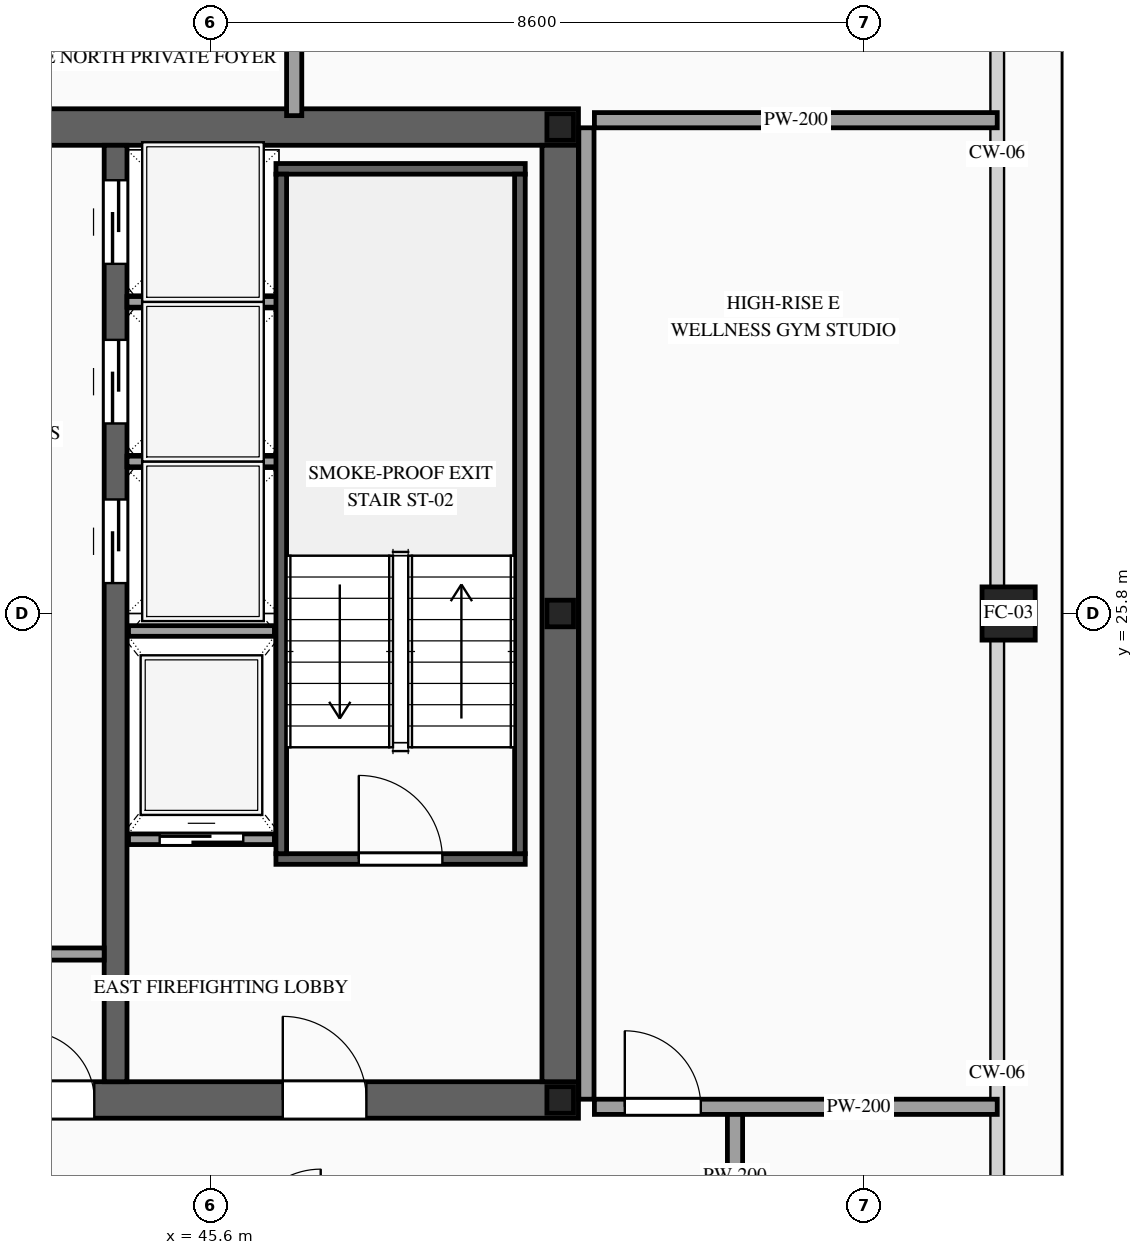
"""IFC4 building model, lengths in metres.
Left out: names, types, materials, properties, quantities, classifications, styles, units other than length and angle.
Written with IfcOpenShell. Run it as: python <this file> out.ifc"""

import sys

from ifc_helpers import new_model, si_unit, direction, frame, frame_2d, origin, origin_2d, place, context, subcontext, project, spatial, rectangle, hollow_rectangle, i_section, extrude, source, transform, mapped, element, fill, save


model = new_model("IFC4")
c1 = context("Model", 3, precision=1e-05, world=origin(), true_north=direction((0.0, 1.0)))
c2 = subcontext(c1, "Body", "Model", "MODEL_VIEW")
j1 = project(units=[si_unit("LENGTHUNIT", "METRE"), si_unit("PLANEANGLEUNIT", "RADIAN")], contexts=[c1])
p1 = place(None, origin())
s1 = spatial("IfcSite", under=j1, at=p1, CompositionType="ELEMENT")
p2 = place(p1, origin())
s2 = spatial("IfcBuilding", under=s1, at=p2, CompositionType="ELEMENT")
p3 = place(p2, frame((0.0, 0.0, 303.1)))
s3 = spatial("IfcBuildingStorey", under=s2, at=p3, CompositionType="ELEMENT", Elevation=303.1)
p4 = place(p3, frame((23.56, 19.4, 0.0), z_axis=(0.0, 0.0, 1.0), x_axis=(1.0, 0.0, 0.0)))
e1 = element("IfcWall", 1, at=p4, inside=s3, PredefinedType="SHEAR", context=c2, shape_type="SweptSolid", body=[
    extrude(rectangle(XDim=26.88, YDim=0.48, at=frame_2d((13.44, 0.0))), origin(), (0.0, 0.0, 1.0), 3.5),
])
p5 = place(p4, frame((1.89, 0.0, 0.0)))
e2 = element("IfcOpeningElement", 2, at=p5, cuts=e1, PredefinedType="OPENING", context=c2, shape_type="SweptSolid", body=[
    extrude(rectangle(XDim=1.1, YDim=2.2, at=frame_2d((0.55, 1.1))), frame((0.0, 0.255, 0.0), z_axis=(0.0, -1.0, 0.0), x_axis=(1.0, 0.0, 0.0)), (0.0, 0.0, 1.0), 0.51),
])
p6 = place(p4, frame((9.79, 0.0, 0.0)))
e3 = element("IfcOpeningElement", 3, at=p6, cuts=e1, PredefinedType="OPENING", context=c2, shape_type="SweptSolid", body=[
    extrude(rectangle(XDim=1.1, YDim=2.2, at=frame_2d((0.55, 1.1))), frame((0.0, 0.255, 0.0), z_axis=(0.0, -1.0, 0.0), x_axis=(1.0, 0.0, 0.0)), (0.0, 0.0, 1.0), 0.51),
])
p7 = place(p4, frame((22.99, 0.0, 0.0)))
e4 = element("IfcOpeningElement", 4, at=p7, cuts=e1, PredefinedType="OPENING", context=c2, shape_type="SweptSolid", body=[
    extrude(rectangle(XDim=1.1, YDim=2.2, at=frame_2d((0.55, 1.1))), frame((0.0, 0.255, 0.0), z_axis=(0.0, -1.0, 0.0), x_axis=(1.0, 0.0, 0.0)), (0.0, 0.0, 1.0), 0.51),
])
p8 = place(p4, frame((19.61, 0.0, 0.0)))
e5 = element("IfcOpeningElement", 5, at=p8, cuts=e1, PredefinedType="OPENING", context=c2, shape_type="SweptSolid", body=[
    extrude(rectangle(XDim=0.9, YDim=2.15, at=frame_2d((0.45, 1.075))), frame((0.0, 0.255, 0.0), z_axis=(0.0, -1.0, 0.0), x_axis=(1.0, 0.0, 0.0)), (0.0, 0.0, 1.0), 0.51),
])
p9 = place(p4, frame((18.17, 0.0, 0.0)))
e6 = element("IfcOpeningElement", 6, at=p9, cuts=e1, PredefinedType="OPENING", context=c2, shape_type="SweptSolid", body=[
    extrude(rectangle(XDim=0.9, YDim=2.15, at=frame_2d((0.45, 1.075))), frame((0.0, 0.255, 0.0), z_axis=(0.0, -1.0, 0.0), x_axis=(1.0, 0.0, 0.0)), (0.0, 0.0, 1.0), 0.51),
])
p10 = place(p3, frame((23.56, 32.2, 0.0), z_axis=(0.0, 0.0, 1.0), x_axis=(1.0, 0.0, 0.0)))
e7 = element("IfcWall", 7, at=p10, inside=s3, PredefinedType="SHEAR", context=c2, shape_type="SweptSolid", body=[
    extrude(rectangle(XDim=26.88, YDim=0.48, at=frame_2d((13.44, 0.0))), origin(), (0.0, 0.0, 1.0), 3.5),
])
p11 = place(p10, frame((4.51, 0.0, 0.0)))
e8 = element("IfcOpeningElement", 8, at=p11, cuts=e7, PredefinedType="OPENING", context=c2, shape_type="SweptSolid", body=[
    extrude(rectangle(XDim=0.9, YDim=2.15, at=frame_2d((0.45, 1.075))), frame((0.0, 0.255, 0.0), z_axis=(0.0, -1.0, 0.0), x_axis=(1.0, 0.0, 0.0)), (0.0, 0.0, 1.0), 0.51),
])
p12 = place(p10, frame((9.79, 0.0, 0.0)))
e9 = element("IfcOpeningElement", 9, at=p12, cuts=e7, PredefinedType="OPENING", context=c2, shape_type="SweptSolid", body=[
    extrude(rectangle(XDim=1.1, YDim=2.2, at=frame_2d((0.55, 1.1))), frame((0.0, 0.255, 0.0), z_axis=(0.0, -1.0, 0.0), x_axis=(1.0, 0.0, 0.0)), (0.0, 0.0, 1.0), 0.51),
])
p13 = place(p10, frame((15.64, 0.0, 0.0)))
e10 = element("IfcOpeningElement", 10, at=p13, cuts=e7, PredefinedType="OPENING", context=c2, shape_type="SweptSolid", body=[
    extrude(rectangle(XDim=1.1, YDim=2.2, at=frame_2d((0.55, 1.1))), frame((0.0, 0.255, 0.0), z_axis=(0.0, -1.0, 0.0), x_axis=(1.0, 0.0, 0.0)), (0.0, 0.0, 1.0), 0.51),
])
p14 = place(p10, frame((18.74, 0.0, 0.0)))
e11 = element("IfcOpeningElement", 11, at=p14, cuts=e7, PredefinedType="OPENING", context=c2, shape_type="SweptSolid", body=[
    extrude(rectangle(XDim=1.1, YDim=2.2, at=frame_2d((0.55, 1.1))), frame((0.0, 0.255, 0.0), z_axis=(0.0, -1.0, 0.0), x_axis=(1.0, 0.0, 0.0)), (0.0, 0.0, 1.0), 0.51),
])
m1 = source(origin(), c2, "Body", "SweptSolid", [
    extrude(rectangle(XDim=12.32, YDim=0.48, at=frame_2d((6.16, 0.0))), origin(), (0.0, 0.0, 1.0), 3.5),
])
p15 = place(p3, frame((50.2, 19.64, 0.0), z_axis=(0.0, 0.0, 1.0), x_axis=(0.0, 1.0, 0.0)))
e12 = element("IfcWall", 12, at=p15, inside=s3, PredefinedType="SHEAR", context=c2, shape_type="MappedRepresentation", body=[
    mapped(m1, transform((0.0, 0.0, 0.0), scale=1.0)),
])
p16 = place(p3, frame((44.35, 19.64, 0.0), z_axis=(0.0, 0.0, 1.0), x_axis=(0.0, 1.0, 0.0)))
e13 = element("IfcWall", 13, at=p16, inside=s3, PredefinedType="SOLIDWALL", context=c2, shape_type="SweptSolid", body=[
    extrude(rectangle(XDim=12.32, YDim=0.3, at=frame_2d((6.16, 0.0))), origin(), (0.0, 0.0, 1.0), 3.5),
])
p17 = place(p16, frame((6.56, 0.0, 0.0)))
e14 = element("IfcOpeningElement", 14, at=p17, cuts=e13, PredefinedType="OPENING", context=c2, shape_type="SweptSolid", body=[
    extrude(rectangle(XDim=1.1, YDim=2.2, at=frame_2d((0.55, 1.1))), frame((0.0, 0.165, 0.0), z_axis=(0.0, -1.0, 0.0), x_axis=(1.0, 0.0, 0.0)), (0.0, 0.0, 1.0), 0.33),
])
p18 = place(p16, frame((8.66, 0.0, 0.0)))
e15 = element("IfcOpeningElement", 15, at=p18, cuts=e13, PredefinedType="OPENING", context=c2, shape_type="SweptSolid", body=[
    extrude(rectangle(XDim=1.1, YDim=2.2, at=frame_2d((0.55, 1.1))), frame((0.0, 0.165, 0.0), z_axis=(0.0, -1.0, 0.0), x_axis=(1.0, 0.0, 0.0)), (0.0, 0.0, 1.0), 0.33),
])
p19 = place(p16, frame((10.76, 0.0, 0.0)))
e16 = element("IfcOpeningElement", 16, at=p19, cuts=e13, PredefinedType="OPENING", context=c2, shape_type="SweptSolid", body=[
    extrude(rectangle(XDim=1.1, YDim=2.2, at=frame_2d((0.55, 1.1))), frame((0.0, 0.165, 0.0), z_axis=(0.0, -1.0, 0.0), x_axis=(1.0, 0.0, 0.0)), (0.0, 0.0, 1.0), 0.33),
])
m2 = source(origin(), c2, "Body", "SweptSolid", [
    extrude(i_section(OverallWidth=0.35, OverallDepth=0.35, WebThickness=0.012, FlangeThickness=0.019, at=origin_2d()), origin(), (0.0, 0.0, 1.0), 3.5),
])
for number, where, z_axis, x_axis in (
    (17, (50.2, 19.4, 0.0), (0.0, 0.0, 1.0), (1.0, 0.0, 0.0)),
    (18, (50.2, 25.8, 0.0), (0.0, 0.0, 1.0), (1.0, 0.0, 0.0)),
    (19, (50.2, 32.2, 0.0), (0.0, 0.0, 1.0), (1.0, 0.0, 0.0)),
):
    element("IfcColumn", number, at=place(p3, frame(where, z_axis=z_axis, x_axis=x_axis)), inside=s3, PredefinedType="COLUMN", context=c2, shape_type="MappedRepresentation", body=[
        mapped(m2, transform((0.0, 0.0, 0.0), scale=1.0)),
    ])
m3 = source(origin(), c2, "Body", "SweptSolid", [
    extrude(hollow_rectangle(XDim=0.7, YDim=0.7, WallThickness=0.032, at=origin_2d()), origin(), (0.0, 0.0, 1.0), 3.5),
])
p20 = place(p3, frame((56.1, 25.8, 0.0), z_axis=(0.0, 0.0, 1.0), x_axis=(1.0, 0.0, 0.0)))
e20 = element("IfcColumn", 20, at=p20, inside=s3, PredefinedType="COLUMN", context=c2, shape_type="MappedRepresentation", body=[
    mapped(m3, transform((0.0, 0.0, 0.0), scale=1.0)),
])
p21 = place(p3, frame((44.52, 22.83, 0.0), z_axis=(0.0, 0.0, 1.0), x_axis=(1.0, 0.0, 0.0)))
e21 = element("IfcWall", 21, at=p21, inside=s3, PredefinedType="SOLIDWALL", context=c2, shape_type="SweptSolid", body=[
    extrude(rectangle(XDim=1.92, YDim=0.14, at=frame_2d((0.96, 0.0))), origin(), (0.0, 0.0, 1.0), 3.22),
])
p22 = place(p21, frame((0.41, 0.0, 0.0)))
e22 = element("IfcOpeningElement", 22, at=p22, cuts=e21, PredefinedType="OPENING", context=c2, shape_type="SweptSolid", body=[
    extrude(rectangle(XDim=1.1, YDim=2.2, at=frame_2d((0.55, 1.1))), frame((0.0, 0.085, 0.0), z_axis=(0.0, -1.0, 0.0), x_axis=(1.0, 0.0, 0.0)), (0.0, 0.0, 1.0), 0.17),
])
m4 = source(origin(), c2, "Body", "SweptSolid", [
    extrude(rectangle(XDim=1.92, YDim=0.14, at=frame_2d((0.96, 0.0))), origin(), (0.0, 0.0, 1.0), 3.22),
])
p23 = place(p3, frame((44.52, 25.57, 0.0), z_axis=(0.0, 0.0, 1.0), x_axis=(1.0, 0.0, 0.0)))
e23 = element("IfcWall", 23, at=p23, inside=s3, PredefinedType="SOLIDWALL", context=c2, shape_type="MappedRepresentation", body=[
    mapped(m4, transform((0.0, 0.0, 0.0), scale=1.0)),
])
m5 = source(origin(), c2, "Body", "SweptSolid", [
    extrude(rectangle(XDim=2.0, YDim=0.14, at=frame_2d((1.0, 0.0))), origin(), (0.0, 0.0, 1.0), 3.22),
])
for number, where, z_axis, x_axis in (
    (24, (44.5, 27.8, 0.0), (0.0, 0.0, 1.0), (1.0, 0.0, 0.0)),
    (25, (44.5, 29.9, 0.0), (0.0, 0.0, 1.0), (1.0, 0.0, 0.0)),
):
    element("IfcWall", number, at=place(p3, frame(where, z_axis=z_axis, x_axis=x_axis)), inside=s3, PredefinedType="SOLIDWALL", context=c2, shape_type="MappedRepresentation", body=[
        mapped(m5, transform((0.0, 0.0, 0.0), scale=1.0)),
    ])
p24 = place(p3, frame((46.46, 22.57, 0.0), z_axis=(0.0, 0.0, 1.0), x_axis=(1.0, 0.0, 0.0)))
e26 = element("IfcWall", 26, at=p24, inside=s3, PredefinedType="SOLIDWALL", context=c2, shape_type="SweptSolid", body=[
    extrude(rectangle(XDim=3.28, YDim=0.14, at=frame_2d((1.64, 0.0))), origin(), (0.0, 0.0, 1.0), 3.22),
])
p25 = place(p24, frame((1.09, 0.0, 0.0)))
e27 = element("IfcOpeningElement", 27, at=p25, cuts=e26, PredefinedType="OPENING", context=c2, shape_type="SweptSolid", body=[
    extrude(rectangle(XDim=1.1, YDim=2.2, at=frame_2d((0.55, 1.1))), frame((0.0, 0.085, 0.0), z_axis=(0.0, -1.0, 0.0), x_axis=(1.0, 0.0, 0.0)), (0.0, 0.0, 1.0), 0.17),
])
m6 = source(origin(), c2, "Body", "SweptSolid", [
    extrude(rectangle(XDim=3.28, YDim=0.14, at=frame_2d((1.64, 0.0))), origin(), (0.0, 0.0, 1.0), 3.22),
])
p26 = place(p3, frame((46.46, 31.65, 0.0), z_axis=(0.0, 0.0, 1.0), x_axis=(1.0, 0.0, 0.0)))
e28 = element("IfcWall", 28, at=p26, inside=s3, PredefinedType="SOLIDWALL", context=c2, shape_type="MappedRepresentation", body=[
    mapped(m6, transform((0.0, 0.0, 0.0), scale=1.0)),
])
m7 = source(origin(), c2, "Body", "SweptSolid", [
    extrude(rectangle(XDim=8.94, YDim=0.14, at=frame_2d((4.47, 0.0))), origin(), (0.0, 0.0, 1.0), 3.22),
])
for number, where, z_axis, x_axis in (
    (29, (46.53, 22.64, 0.0), (0.0, 0.0, 1.0), (0.0, 1.0, 0.0)),
    (30, (49.67, 22.64, 0.0), (0.0, 0.0, 1.0), (0.0, 1.0, 0.0)),
):
    element("IfcWall", number, at=place(p3, frame(where, z_axis=z_axis, x_axis=x_axis)), inside=s3, PredefinedType="SOLIDWALL", context=c2, shape_type="MappedRepresentation", body=[
        mapped(m7, transform((0.0, 0.0, 0.0), scale=1.0)),
    ])
m8 = source(origin(), c2, "Body", "SweptSolid", [
    extrude(rectangle(XDim=1.17, YDim=0.16, at=frame_2d((0.585, 0.0))), origin(), (0.0, 0.0, 1.0), 3.22),
])
p27 = place(p3, frame((43.03, 21.32, 0.0), z_axis=(0.0, 0.0, 1.0), x_axis=(1.0, 0.0, 0.0)))
e31 = element("IfcWall", 31, at=p27, inside=s3, PredefinedType="PARTITIONING", context=c2, shape_type="MappedRepresentation", body=[
    mapped(m8, transform((0.0, 0.0, 0.0), scale=1.0)),
])
m9 = source(origin(), c2, "Body", "SweptSolid", [
    extrude(rectangle(XDim=1.7, YDim=0.2, at=frame_2d((0.85, 0.0))), origin(), (0.0, 0.0, 1.0), 3.22),
])
for number, where, z_axis, x_axis in (
    (32, (46.7, 32.35, 0.0), (0.0, 0.0, 1.0), (0.0, 1.0, 0.0)),
    (33, (52.5, 17.55, 0.0), (0.0, 0.0, 1.0), (0.0, 1.0, 0.0)),
):
    element("IfcWall", number, at=place(p3, frame(where, z_axis=z_axis, x_axis=x_axis)), inside=s3, PredefinedType="PARTITIONING", context=c2, shape_type="MappedRepresentation", body=[
        mapped(m9, transform((0.0, 0.0, 0.0), scale=1.0)),
    ])
p28 = place(p3, frame((50.65, 19.31, 0.0), z_axis=(0.0, 0.0, 1.0), x_axis=(1.0, 0.0, 0.0)))
e34 = element("IfcWall", 34, at=p28, inside=s3, PredefinedType="PARTITIONING", context=c2, shape_type="SweptSolid", body=[
    extrude(rectangle(XDim=5.3, YDim=0.2, at=frame_2d((2.65, 0.0))), origin(), (0.0, 0.0, 1.0), 2.765),
])
p29 = place(p28, frame((0.4, 0.0, 0.0)))
e35 = element("IfcOpeningElement", 35, at=p29, cuts=e34, PredefinedType="OPENING", context=c2, shape_type="SweptSolid", body=[
    extrude(rectangle(XDim=1.0, YDim=2.2, at=frame_2d((0.5, 1.1))), frame((0.0, 0.115, 0.0), z_axis=(0.0, -1.0, 0.0), x_axis=(1.0, 0.0, 0.0)), (0.0, 0.0, 1.0), 0.23),
])
m10 = source(origin(), c2, "Body", "SweptSolid", [
    extrude(rectangle(XDim=5.3, YDim=0.2, at=frame_2d((2.65, 0.0))), origin(), (0.0, 0.0, 1.0), 2.765),
])
p30 = place(p3, frame((50.65, 32.29, 0.0), z_axis=(0.0, 0.0, 1.0), x_axis=(1.0, 0.0, 0.0)))
e36 = element("IfcWall", 36, at=p30, inside=s3, PredefinedType="PARTITIONING", context=c2, shape_type="MappedRepresentation", body=[
    mapped(m10, transform((0.0, 0.0, 0.0), scale=1.0)),
])
m11 = source(origin(), c2, "Body", "SweptSolid", [
    extrude(rectangle(XDim=12.78, YDim=0.2, at=frame_2d((6.39, 0.0))), origin(), (0.0, 0.0, 1.0), 3.22),
])
p31 = place(p3, frame((50.545, 19.41, 0.0), z_axis=(0.0, 0.0, 1.0), x_axis=(0.0, 1.0, 0.0)))
e37 = element("IfcWall", 37, at=p31, inside=s3, PredefinedType="PARTITIONING", context=c2, shape_type="MappedRepresentation", body=[
    mapped(m11, transform((0.0, 0.0, 0.0), scale=1.0)),
])
m12 = source(origin(), c2, "Body", "SweptSolid", [
    extrude(rectangle(XDim=1.1, YDim=2.2, at=frame_2d((0.55, 1.1))), frame((0.0, 0.025, 0.0), z_axis=(0.0, -1.0, 0.0), x_axis=(1.0, 0.0, 0.0)), (0.0, 0.0, 1.0), 0.05),
])
p32 = place(p22, origin())
e38 = element("IfcDoor", 38, at=p32, inside=s3, OperationType="SLIDING_TO_RIGHT", PredefinedType="DOOR", context=c2, shape_type="MappedRepresentation", body=[
    mapped(m12, transform((0.0, 0.0, 0.0), scale=1.0)),
])
fill(e22, e38)
p33 = place(p17, origin())
e39 = element("IfcDoor", 39, at=p33, inside=s3, OperationType="SLIDING_TO_LEFT", PredefinedType="DOOR", context=c2, shape_type="MappedRepresentation", body=[
    mapped(m12, transform((0.0, 0.0, 0.0), scale=1.0)),
])
fill(e14, e39)
p34 = place(p18, origin())
e40 = element("IfcDoor", 40, at=p34, inside=s3, OperationType="SLIDING_TO_RIGHT", PredefinedType="DOOR", context=c2, shape_type="MappedRepresentation", body=[
    mapped(m12, transform((0.0, 0.0, 0.0), scale=1.0)),
])
fill(e15, e40)
p35 = place(p19, origin())
e41 = element("IfcDoor", 41, at=p35, inside=s3, OperationType="SLIDING_TO_LEFT", PredefinedType="DOOR", context=c2, shape_type="MappedRepresentation", body=[
    mapped(m12, transform((0.0, 0.0, 0.0), scale=1.0)),
])
fill(e16, e41)
m13 = source(origin(), c2, "Body", "SweptSolid", [
    extrude(rectangle(XDim=1.1, YDim=2.2, at=frame_2d((0.55, 1.1))), frame((0.0, 0.025, 0.0), z_axis=(0.0, -1.0, 0.0), x_axis=(1.0, 0.0, 0.0)), (0.0, 0.0, 1.0), 0.05),
])
p36 = place(p25, origin())
e42 = element("IfcDoor", 42, at=p36, inside=s3, OperationType="SINGLE_SWING_LEFT", PredefinedType="DOOR", context=c2, shape_type="MappedRepresentation", body=[
    mapped(m13, transform((0.0, 0.0, 0.0), scale=1.0)),
])
fill(e27, e42)
p37 = place(p7, origin())
e43 = element("IfcDoor", 43, at=p37, inside=s3, OperationType="SINGLE_SWING_LEFT", PredefinedType="DOOR", context=c2, shape_type="MappedRepresentation", body=[
    mapped(m13, transform((0.0, 0.0, 0.0), scale=1.0)),
])
fill(e4, e43)
m14 = source(origin(), c2, "Body", "SweptSolid", [
    extrude(rectangle(XDim=0.9, YDim=2.15, at=frame_2d((0.45, 1.075))), frame((0.0, 0.025, 0.0), z_axis=(0.0, -1.0, 0.0), x_axis=(1.0, 0.0, 0.0)), (0.0, 0.0, 1.0), 0.05),
])
p38 = place(p8, origin())
e44 = element("IfcDoor", 44, at=p38, inside=s3, OperationType="SINGLE_SWING_LEFT", PredefinedType="DOOR", context=c2, shape_type="MappedRepresentation", body=[
    mapped(m14, transform((0.0, 0.0, 0.0), scale=1.0)),
])
fill(e5, e44)
m15 = source(origin(), c2, "Body", "SweptSolid", [
    extrude(rectangle(XDim=1.0, YDim=2.2, at=frame_2d((0.5, 1.1))), frame((0.0, 0.025, 0.0), z_axis=(0.0, -1.0, 0.0), x_axis=(1.0, 0.0, 0.0)), (0.0, 0.0, 1.0), 0.05),
])
p39 = place(p29, origin())
e45 = element("IfcDoor", 45, at=p39, inside=s3, OperationType="SINGLE_SWING_LEFT", PredefinedType="DOOR", context=c2, shape_type="MappedRepresentation", body=[
    mapped(m15, transform((0.0, 0.0, 0.0), scale=1.0)),
])
fill(e35, e45)
save(model, sys.argv[1])
